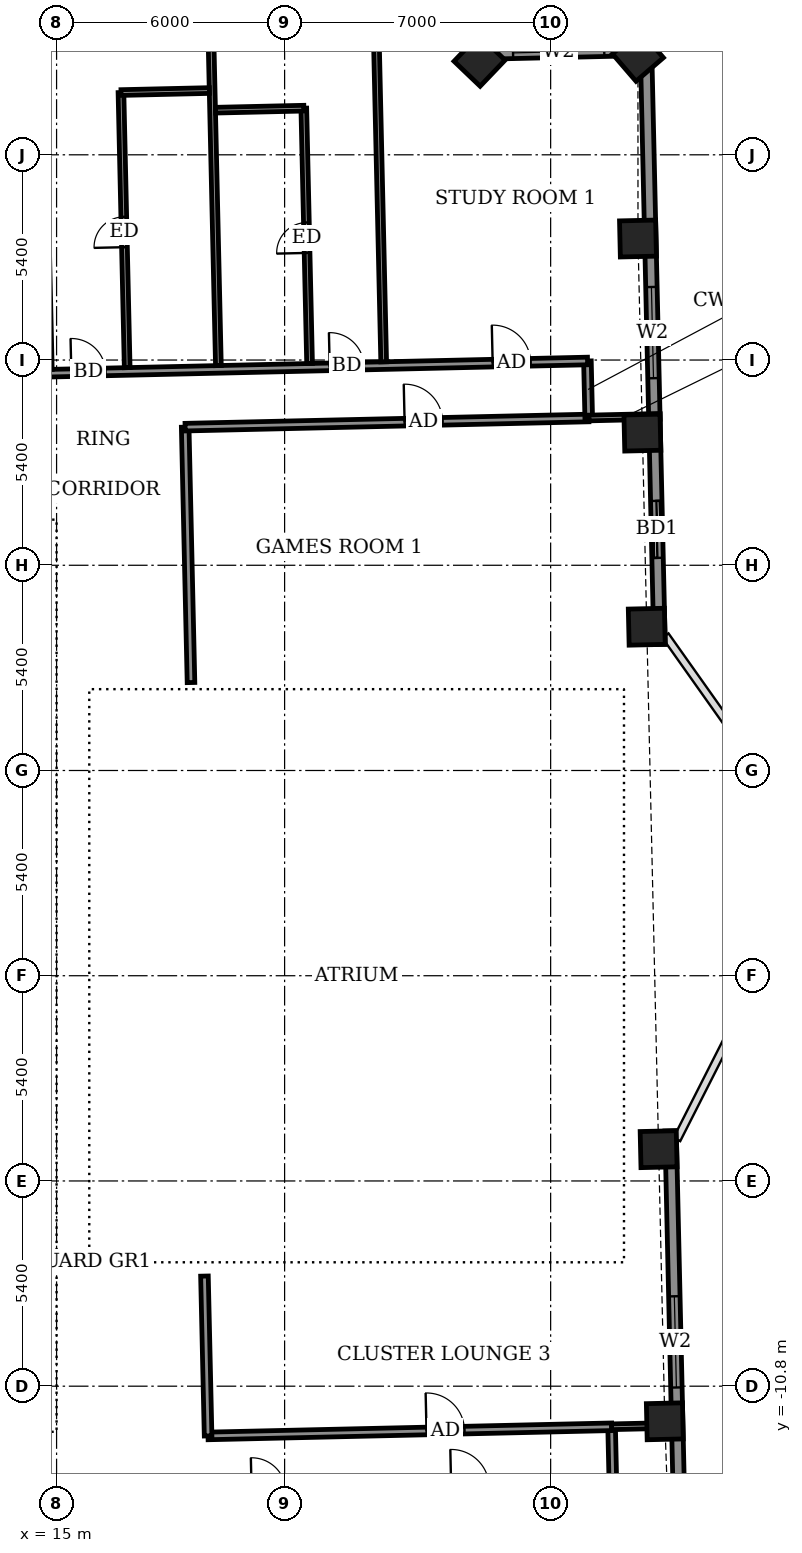
"""IFC4 building model, lengths in metres.
Left out: names, types, materials, properties, quantities, classifications, styles, units other than length and angle.
Written with IfcOpenShell. Run it as: python <this file> out.ifc"""

import sys

from ifc_helpers import new_model, si_unit, direction, frame, frame_2d, origin, origin_2d, place, context, subcontext, project, spatial, rectangle, extrude, element, fill, save


model = new_model("IFC4")
c1 = context("Model", 3, precision=1e-05, world=origin(), true_north=direction((0.0, 1.0)))
c2 = subcontext(c1, "Body", "Model", "MODEL_VIEW")
j1 = project(units=[si_unit("LENGTHUNIT", "METRE"), si_unit("PLANEANGLEUNIT", "RADIAN")], contexts=[c1])
p1 = place(None, origin())
s1 = spatial("IfcSite", under=j1, at=p1, CompositionType="ELEMENT")
p2 = place(p1, origin())
s2 = spatial("IfcBuilding", under=s1, at=p2, CompositionType="ELEMENT")
p3 = place(p2, frame((0.0, 0.0, 279.9)))
s3 = spatial("IfcBuildingStorey", under=s2, at=p3, CompositionType="ELEMENT", Elevation=279.9)
for number, where, z_axis, x_axis in (
    (1, (31.004, -11.724, -0.55), (0.0, 0.0, 1.0), (-0.023, 1.0, 0.0)),
    (2, (30.841, -4.564, -0.55), (0.0, 0.0, 1.0), (-0.023, 1.0, 0.0)),
    (3, (30.529, 9.183, -0.55), (0.0, 0.0, 1.0), (-0.023, 1.0, 0.0)),
    (4, (30.414, 14.29, -0.55), (0.0, 0.0, 1.0), (-0.023, 1.0, 0.0)),
    (5, (30.298, 19.397, -0.55), (0.0, 0.0, 1.0), (-0.023, 1.0, 0.0)),
    (6, (30.297, 24.205, -0.55), (0.0, 0.0, 1.0), (-0.652, 0.758, 0.0)),
    (7, (26.13, 24.077, -0.55), (0.0, 0.0, 1.0), (-0.723, 0.691, 0.0)),
):
    element("IfcColumn", number, at=place(p3, frame(where, z_axis=z_axis, x_axis=x_axis)), inside=s3, PredefinedType="COLUMN", context=c2, shape_type="SweptSolid", body=[
        extrude(rectangle(XDim=0.95, YDim=0.95, at=origin_2d()), origin(), (0.0, 0.0, 1.0), 3.6),
    ])
p4 = place(p3, frame((31.488, -18.727, 0.0), z_axis=(0.0, 0.0, 1.0), x_axis=(-0.022666132143, 0.999743090226, 0.0)))
e8 = element("IfcWall", 8, at=p4, inside=s3, PredefinedType="SOLIDWALL", context=c2, shape_type="SweptSolid", body=[
    extrude(rectangle(XDim=14.649, YDim=0.3, at=frame_2d((7.324, 0.0))), origin(), (0.0, 0.0, 1.0), 2.5),
])
p5 = place(p4, frame((2.915, 0.0, 0.0)))
e9 = element("IfcOpeningElement", 9, at=p5, cuts=e8, PredefinedType="OPENING", context=c2, shape_type="SweptSolid", body=[
    extrude(rectangle(XDim=1.5, YDim=2.4, at=frame_2d((0.75, 1.2))), frame((0.0, 0.16, 0.0), z_axis=(0.0, -1.0, 0.0), x_axis=(1.0, 0.0, 0.0)), (0.0, 0.0, 1.0), 0.32),
])
p6 = place(p4, frame((7.895, 0.0, 0.9)))
e10 = element("IfcOpeningElement", 10, at=p6, cuts=e8, PredefinedType="OPENING", context=c2, shape_type="SweptSolid", body=[
    extrude(rectangle(XDim=2.4, YDim=1.5, at=frame_2d((1.2, 0.75))), frame((0.0, 0.16, 0.0), z_axis=(0.0, -1.0, 0.0), x_axis=(1.0, 0.0, 0.0)), (0.0, 0.0, 1.0), 0.32),
])
p7 = place(p3, frame((30.865, 8.716, 0.0), z_axis=(0.0, 0.0, 1.0), x_axis=(-0.022682425427, 0.999742720692, 0.0)))
e11 = element("IfcWall", 11, at=p7, inside=s3, PredefinedType="SOLIDWALL", context=c2, shape_type="SweptSolid", body=[
    extrude(rectangle(XDim=15.65, YDim=0.3, at=frame_2d((7.825, 0.0))), origin(), (0.0, 0.0, 1.0), 2.55),
])
p8 = place(p7, frame((2.279, 0.0, 0.0)))
e12 = element("IfcOpeningElement", 12, at=p8, cuts=e11, PredefinedType="OPENING", context=c2, shape_type="SweptSolid", body=[
    extrude(rectangle(XDim=1.5, YDim=2.4, at=frame_2d((0.75, 1.2))), frame((0.0, 0.16, 0.0), z_axis=(0.0, -1.0, 0.0), x_axis=(1.0, 0.0, 0.0)), (0.0, 0.0, 1.0), 0.32),
])
p9 = place(p7, frame((7.008, 0.0, 0.9)))
e13 = element("IfcOpeningElement", 13, at=p9, cuts=e11, PredefinedType="OPENING", context=c2, shape_type="SweptSolid", body=[
    extrude(rectangle(XDim=2.4, YDim=1.5, at=frame_2d((1.2, 0.75))), frame((0.0, 0.16, 0.0), z_axis=(0.0, -1.0, 0.0), x_axis=(1.0, 0.0, 0.0)), (0.0, 0.0, 1.0), 0.32),
])
p10 = place(p3, frame((30.51, 24.362, 0.0), z_axis=(0.0, 0.0, 1.0), x_axis=(-0.999739037152, -0.022844202663, 0.0)))
e14 = element("IfcWall", 14, at=p10, inside=s3, PredefinedType="SOLIDWALL", context=c2, shape_type="SweptSolid", body=[
    extrude(rectangle(XDim=4.2, YDim=0.3, at=frame_2d((2.1, 0.0))), origin(), (0.0, 0.0, 1.0), 2.55),
])
p11 = place(p10, frame((1.1, 0.0, 0.9)))
e15 = element("IfcOpeningElement", 15, at=p11, cuts=e14, PredefinedType="OPENING", context=c2, shape_type="SweptSolid", body=[
    extrude(rectangle(XDim=2.4, YDim=1.5, at=frame_2d((1.2, 0.75))), frame((0.0, 0.16, 0.0), z_axis=(0.0, -1.0, 0.0), x_axis=(1.0, 0.0, 0.0)), (0.0, 0.0, 1.0), 0.32),
])
p12 = place(p3, frame((26.311, 24.266, 0.0), z_axis=(0.0, 0.0, 1.0), x_axis=(-0.022611811187, 0.999744320311, 0.0)))
e16 = element("IfcWall", 16, at=p12, inside=s3, PredefinedType="SOLIDWALL", context=c2, shape_type="SweptSolid", body=[
    extrude(rectangle(XDim=4.2, YDim=0.3, at=frame_2d((2.1, 0.0))), origin(), (0.0, 0.0, 1.0), 2.55),
])
p13 = place(p12, frame((0.688, 0.0, 0.9)))
e17 = element("IfcOpeningElement", 17, at=p13, cuts=e16, PredefinedType="OPENING", context=c2, shape_type="SweptSolid", body=[
    extrude(rectangle(XDim=2.4, YDim=1.5, at=frame_2d((1.2, 0.75))), frame((0.0, 0.16, 0.0), z_axis=(0.0, -1.0, 0.0), x_axis=(1.0, 0.0, 0.0)), (0.0, 0.0, 1.0), 0.32),
])
p14 = place(p3, frame((29.638, -13.368, 0.0), z_axis=(0.0, 0.0, 1.0), x_axis=(-0.022617910375, 0.999744182344, 0.0)))
e18 = element("IfcWall", 18, at=p14, inside=s3, PredefinedType="PARTITIONING", context=c2, shape_type="SweptSolid", body=[
    extrude(rectangle(XDim=1.5, YDim=0.2, at=frame_2d((0.75, 0.0))), origin(), (0.0, 0.0, 1.0), 3.05),
])
p15 = place(p3, frame((18.985, -12.109, 0.0), z_axis=(0.0, 0.0, 1.0), x_axis=(0.999742771882, 0.022680169073, 0.0)))
e19 = element("IfcWall", 19, at=p15, inside=s3, PredefinedType="PARTITIONING", context=c2, shape_type="SweptSolid", body=[
    extrude(rectangle(XDim=10.625, YDim=0.2, at=frame_2d((5.312, 0.0))), origin(), (0.0, 0.0, 1.0), 3.05),
])
p16 = place(p15, frame((5.75, 0.0, 0.0)))
e20 = element("IfcOpeningElement", 20, at=p16, cuts=e19, PredefinedType="OPENING", context=c2, shape_type="SweptSolid", body=[
    extrude(rectangle(XDim=1.0, YDim=2.1, at=frame_2d((0.5, 1.05))), frame((0.0, 0.11, 0.0), z_axis=(0.0, -1.0, 0.0), x_axis=(1.0, 0.0, 0.0)), (0.0, 0.0, 1.0), 0.22),
])
p17 = place(p3, frame((18.987, -12.109, 0.0), z_axis=(0.0, 0.0, 1.0), x_axis=(-0.022807092041, 0.999739884446, 0.0)))
e21 = element("IfcWall", 21, at=p17, inside=s3, PredefinedType="PARTITIONING", context=c2, shape_type="SweptSolid", body=[
    extrude(rectangle(XDim=4.207, YDim=0.2, at=frame_2d((2.104, 0.0))), origin(), (0.0, 0.0, 1.0), 3.05),
])
p18 = place(p3, frame((29.603, -11.868, 0.0), z_axis=(0.0, 0.0, 1.0), x_axis=(0.999741755729, 0.022724916977, 0.0)))
e22 = element("IfcWall", 22, at=p18, inside=s3, PredefinedType="PARTITIONING", context=c2, shape_type="SweptSolid", body=[
    extrude(rectangle(XDim=1.579, YDim=0.15, at=frame_2d((0.79, 0.0))), origin(), (0.0, 0.0, 1.0), 3.05),
])
p19 = place(p3, frame((18.537, 7.714, 0.0), z_axis=(0.0, 0.0, 1.0), x_axis=(-0.022773383809, 0.999740652864, 0.0)))
e23 = element("IfcWall", 23, at=p19, inside=s3, PredefinedType="PARTITIONING", context=c2, shape_type="SweptSolid", body=[
    extrude(rectangle(XDim=6.722, YDim=0.2, at=frame_2d((3.361, 0.0))), origin(), (0.0, 0.0, 1.0), 3.05),
])
p20 = place(p3, frame((18.382, 14.434, 0.0), z_axis=(0.0, 0.0, 1.0), x_axis=(0.999742819156, 0.02267808514, 0.0)))
e24 = element("IfcWall", 24, at=p20, inside=s3, PredefinedType="PARTITIONING", context=c2, shape_type="SweptSolid", body=[
    extrude(rectangle(XDim=10.625, YDim=0.2, at=frame_2d((5.313, 0.0))), origin(), (0.0, 0.0, 1.0), 3.05),
])
p21 = place(p20, frame((5.777, 0.0, 0.0)))
e25 = element("IfcOpeningElement", 25, at=p21, cuts=e24, PredefinedType="OPENING", context=c2, shape_type="SweptSolid", body=[
    extrude(rectangle(XDim=1.0, YDim=2.1, at=frame_2d((0.5, 1.05))), frame((0.0, 0.11, 0.0), z_axis=(0.0, -1.0, 0.0), x_axis=(1.0, 0.0, 0.0)), (0.0, 0.0, 1.0), 0.22),
])
p22 = place(p3, frame((29.002, 14.675, 0.0), z_axis=(0.0, 0.0, 1.0), x_axis=(-0.022617910375, 0.999744182344, 0.0)))
e26 = element("IfcWall", 26, at=p22, inside=s3, PredefinedType="PARTITIONING", context=c2, shape_type="SweptSolid", body=[
    extrude(rectangle(XDim=1.5, YDim=0.2, at=frame_2d((0.75, 0.0))), origin(), (0.0, 0.0, 1.0), 3.05),
])
p23 = place(p3, frame((29.005, 14.675, 0.0), z_axis=(0.0, 0.0, 1.0), x_axis=(0.999737243051, 0.022922583999, 0.0)))
e27 = element("IfcWall", 27, at=p23, inside=s3, PredefinedType="PARTITIONING", context=c2, shape_type="SweptSolid", body=[
    extrude(rectangle(XDim=1.875, YDim=0.15, at=frame_2d((0.937, 0.0))), origin(), (0.0, 0.0, 1.0), 2.55),
])
p24 = place(p3, frame((-26.401, 14.918, 0.0), z_axis=(0.0, 0.0, 1.0), x_axis=(0.99974239733, 0.022696673341, 0.0)))
e28 = element("IfcWall", 28, at=p24, inside=s3, PredefinedType="PARTITIONING", context=c2, shape_type="SweptSolid", body=[
    extrude(rectangle(XDim=55.386, YDim=0.2, at=frame_2d((27.693, 0.0))), origin(), (0.0, 0.0, 1.0), 3.05),
])
p25 = place(p24, frame((52.889, 0.0, 0.0)))
e29 = element("IfcOpeningElement", 29, at=p25, cuts=e28, PredefinedType="OPENING", context=c2, shape_type="SweptSolid", body=[
    extrude(rectangle(XDim=1.0, YDim=2.1, at=frame_2d((0.5, 1.05))), frame((0.0, 0.11, 0.0), z_axis=(0.0, -1.0, 0.0), x_axis=(1.0, 0.0, 0.0)), (0.0, 0.0, 1.0), 0.22),
])
p26 = place(p24, frame((48.6, 0.0, 0.0)))
e30 = element("IfcOpeningElement", 30, at=p26, cuts=e28, PredefinedType="OPENING", context=c2, shape_type="SweptSolid", body=[
    extrude(rectangle(XDim=0.9, YDim=2.1, at=frame_2d((0.45, 1.05))), frame((0.0, 0.11, 0.0), z_axis=(0.0, -1.0, 0.0), x_axis=(1.0, 0.0, 0.0)), (0.0, 0.0, 1.0), 0.22),
])
p27 = place(p24, frame((41.8, 0.0, 0.0)))
e31 = element("IfcOpeningElement", 31, at=p27, cuts=e28, PredefinedType="OPENING", context=c2, shape_type="SweptSolid", body=[
    extrude(rectangle(XDim=0.9, YDim=2.1, at=frame_2d((0.45, 1.05))), frame((0.0, 0.11, 0.0), z_axis=(0.0, -1.0, 0.0), x_axis=(1.0, 0.0, 0.0)), (0.0, 0.0, 1.0), 0.22),
])
p28 = place(p24, frame((39.675, 0.0, 0.0)))
e32 = element("IfcOpeningElement", 32, at=p28, cuts=e28, PredefinedType="OPENING", context=c2, shape_type="SweptSolid", body=[
    extrude(rectangle(XDim=0.9, YDim=2.1, at=frame_2d((0.45, 1.05))), frame((0.0, 0.11, 0.0), z_axis=(0.0, -1.0, 0.0), x_axis=(1.0, 0.0, 0.0)), (0.0, 0.0, 1.0), 0.22),
])
p29 = place(p24, frame((32.675, 0.0, 0.0)))
e33 = element("IfcOpeningElement", 33, at=p29, cuts=e28, PredefinedType="OPENING", context=c2, shape_type="SweptSolid", body=[
    extrude(rectangle(XDim=0.9, YDim=2.1, at=frame_2d((0.45, 1.05))), frame((0.0, 0.11, 0.0), z_axis=(0.0, -1.0, 0.0), x_axis=(1.0, 0.0, 0.0)), (0.0, 0.0, 1.0), 0.22),
])
p30 = place(p24, frame((30.4, 0.0, 0.0)))
e34 = element("IfcOpeningElement", 34, at=p30, cuts=e28, PredefinedType="OPENING", context=c2, shape_type="SweptSolid", body=[
    extrude(rectangle(XDim=0.9, YDim=2.1, at=frame_2d((0.45, 1.05))), frame((0.0, 0.11, 0.0), z_axis=(0.0, -1.0, 0.0), x_axis=(1.0, 0.0, 0.0)), (0.0, 0.0, 1.0), 0.22),
])
p31 = place(p24, frame((23.225, 0.0, 0.0)))
e35 = element("IfcOpeningElement", 35, at=p31, cuts=e28, PredefinedType="OPENING", context=c2, shape_type="SweptSolid", body=[
    extrude(rectangle(XDim=0.9, YDim=2.1, at=frame_2d((0.45, 1.05))), frame((0.0, 0.11, 0.0), z_axis=(0.0, -1.0, 0.0), x_axis=(1.0, 0.0, 0.0)), (0.0, 0.0, 1.0), 0.22),
])
p32 = place(p24, frame((20.9, 0.0, 0.0)))
e36 = element("IfcOpeningElement", 36, at=p32, cuts=e28, PredefinedType="OPENING", context=c2, shape_type="SweptSolid", body=[
    extrude(rectangle(XDim=0.9, YDim=2.1, at=frame_2d((0.45, 1.05))), frame((0.0, 0.11, 0.0), z_axis=(0.0, -1.0, 0.0), x_axis=(1.0, 0.0, 0.0)), (0.0, 0.0, 1.0), 0.22),
])
p33 = place(p24, frame((13.9, 0.0, 0.0)))
e37 = element("IfcOpeningElement", 37, at=p33, cuts=e28, PredefinedType="OPENING", context=c2, shape_type="SweptSolid", body=[
    extrude(rectangle(XDim=0.9, YDim=2.1, at=frame_2d((0.45, 1.05))), frame((0.0, 0.11, 0.0), z_axis=(0.0, -1.0, 0.0), x_axis=(1.0, 0.0, 0.0)), (0.0, 0.0, 1.0), 0.22),
])
p34 = place(p24, frame((11.775, 0.0, 0.0)))
e38 = element("IfcOpeningElement", 38, at=p34, cuts=e28, PredefinedType="OPENING", context=c2, shape_type="SweptSolid", body=[
    extrude(rectangle(XDim=0.9, YDim=2.1, at=frame_2d((0.45, 1.05))), frame((0.0, 0.11, 0.0), z_axis=(0.0, -1.0, 0.0), x_axis=(1.0, 0.0, 0.0)), (0.0, 0.0, 1.0), 0.22),
])
p35 = place(p24, frame((1.65, 0.0, 0.0)))
e39 = element("IfcOpeningElement", 39, at=p35, cuts=e28, PredefinedType="OPENING", context=c2, shape_type="SweptSolid", body=[
    extrude(rectangle(XDim=1.0, YDim=2.1, at=frame_2d((0.5, 1.05))), frame((0.0, 0.11, 0.0), z_axis=(0.0, -1.0, 0.0), x_axis=(1.0, 0.0, 0.0)), (0.0, 0.0, 1.0), 0.22),
])
p36 = place(p24, frame((7.025, 0.0, 0.0)))
e40 = element("IfcOpeningElement", 40, at=p36, cuts=e28, PredefinedType="OPENING", context=c2, shape_type="SweptSolid", body=[
    extrude(rectangle(XDim=0.9, YDim=2.1, at=frame_2d((0.45, 1.05))), frame((0.0, 0.11, 0.0), z_axis=(0.0, -1.0, 0.0), x_axis=(1.0, 0.0, 0.0)), (0.0, 0.0, 1.0), 0.22),
])
p37 = place(p3, frame((16.858, 16.0, 0.0), z_axis=(0.0, 0.0, 1.0), x_axis=(-0.022627186748, 0.999743972435, 0.0)))
e41 = element("IfcWall", 41, at=p37, inside=s3, PredefinedType="PARTITIONING", context=c2, shape_type="SweptSolid", body=[
    extrude(rectangle(XDim=7.24, YDim=0.15, at=frame_2d((3.62, 0.0))), origin(), (0.0, 0.0, 1.0), 3.05),
])
p38 = place(p37, frame((3.17, 0.0, 0.0)))
e42 = element("IfcOpeningElement", 42, at=p38, cuts=e41, PredefinedType="OPENING", context=c2, shape_type="SweptSolid", body=[
    extrude(rectangle(XDim=0.8, YDim=2.1, at=frame_2d((0.4, 1.05))), frame((0.0, 0.085, 0.0), z_axis=(0.0, -1.0, 0.0), x_axis=(1.0, 0.0, 0.0)), (0.0, 0.0, 1.0), 0.17),
])
p39 = place(p3, frame((19.258, 16.054, 0.0), z_axis=(0.0, 0.0, 1.0), x_axis=(-0.022740189192, 0.999741408463, 0.0)))
e43 = element("IfcWall", 43, at=p39, inside=s3, PredefinedType="PARTITIONING", context=c2, shape_type="SweptSolid", body=[
    extrude(rectangle(XDim=12.4, YDim=0.15, at=frame_2d((6.2, 0.0))), origin(), (0.0, 0.0, 1.0), 3.05),
])
p40 = place(p3, frame((21.657, 16.109, 0.0), z_axis=(0.0, 0.0, 1.0), x_axis=(-0.022634748998, 0.99974380125, 0.0)))
e44 = element("IfcWall", 44, at=p40, inside=s3, PredefinedType="PARTITIONING", context=c2, shape_type="SweptSolid", body=[
    extrude(rectangle(XDim=6.72, YDim=0.15, at=frame_2d((3.36, 0.0))), origin(), (0.0, 0.0, 1.0), 3.05),
])
p41 = place(p40, frame((2.91, 0.0, 0.0)))
e45 = element("IfcOpeningElement", 45, at=p41, cuts=e44, PredefinedType="OPENING", context=c2, shape_type="SweptSolid", body=[
    extrude(rectangle(XDim=0.8, YDim=2.1, at=frame_2d((0.4, 1.05))), frame((0.0, 0.085, 0.0), z_axis=(0.0, -1.0, 0.0), x_axis=(1.0, 0.0, 0.0)), (0.0, 0.0, 1.0), 0.17),
])
p42 = place(p3, frame((23.607, 16.153, 0.0), z_axis=(0.0, 0.0, 1.0), x_axis=(-0.022740189192, 0.999741408463, 0.0)))
e46 = element("IfcWall", 46, at=p42, inside=s3, PredefinedType="PARTITIONING", context=c2, shape_type="SweptSolid", body=[
    extrude(rectangle(XDim=12.4, YDim=0.15, at=frame_2d((6.2, 0.0))), origin(), (0.0, 0.0, 1.0), 2.55),
])
p43 = place(p3, frame((19.182, 22.774, 0.0), z_axis=(0.0, 0.0, 1.0), x_axis=(0.99974053329, 0.022778632478, 0.0)))
e47 = element("IfcWall", 47, at=p43, inside=s3, PredefinedType="PARTITIONING", context=c2, shape_type="SweptSolid", body=[
    extrude(rectangle(XDim=2.326, YDim=0.15, at=frame_2d((1.163, 0.0))), origin(), (0.0, 0.0, 1.0), 3.05),
])
p44 = place(p3, frame((16.696, 23.238, 0.0), z_axis=(0.0, 0.0, 1.0), x_axis=(0.999740478815, 0.022781023197, 0.0)))
e48 = element("IfcWall", 48, at=p44, inside=s3, PredefinedType="PARTITIONING", context=c2, shape_type="SweptSolid", body=[
    extrude(rectangle(XDim=2.325, YDim=0.15, at=frame_2d((1.163, 0.0))), origin(), (0.0, 0.0, 1.0), 3.05),
])
p45 = place(p6, origin())
e49 = element("IfcWindow", 49, at=p45, inside=s3, PartitioningType="DOUBLE_PANEL_VERTICAL", PredefinedType="WINDOW", context=c2, shape_type="SweptSolid", body=[
    extrude(rectangle(XDim=2.4, YDim=1.5, at=frame_2d((1.2, 0.75))), frame((0.0, 0.03, 0.0), z_axis=(0.0, -1.0, 0.0), x_axis=(1.0, 0.0, 0.0)), (0.0, 0.0, 1.0), 0.06),
])
fill(e10, e49)
p46 = place(p8, origin())
e50 = element("IfcDoor", 50, at=p46, inside=s3, OperationType="SLIDING_TO_LEFT", PredefinedType="DOOR", context=c2, shape_type="SweptSolid", body=[
    extrude(rectangle(XDim=1.5, YDim=2.4, at=frame_2d((0.75, 1.2))), frame((0.0, 0.025, 0.0), z_axis=(0.0, -1.0, 0.0), x_axis=(1.0, 0.0, 0.0)), (0.0, 0.0, 1.0), 0.05),
])
fill(e12, e50)
p47 = place(p9, origin())
e51 = element("IfcWindow", 51, at=p47, inside=s3, PartitioningType="DOUBLE_PANEL_VERTICAL", PredefinedType="WINDOW", context=c2, shape_type="SweptSolid", body=[
    extrude(rectangle(XDim=2.4, YDim=1.5, at=frame_2d((1.2, 0.75))), frame((0.0, 0.03, 0.0), z_axis=(0.0, -1.0, 0.0), x_axis=(1.0, 0.0, 0.0)), (0.0, 0.0, 1.0), 0.06),
])
fill(e13, e51)
p48 = place(p11, origin())
e52 = element("IfcWindow", 52, at=p48, inside=s3, PartitioningType="DOUBLE_PANEL_VERTICAL", PredefinedType="WINDOW", context=c2, shape_type="SweptSolid", body=[
    extrude(rectangle(XDim=2.4, YDim=1.5, at=frame_2d((1.2, 0.75))), frame((0.0, 0.03, 0.0), z_axis=(0.0, -1.0, 0.0), x_axis=(1.0, 0.0, 0.0)), (0.0, 0.0, 1.0), 0.06),
])
fill(e15, e52)
p49 = place(p16, origin())
e53 = element("IfcDoor", 53, at=p49, inside=s3, OperationType="SINGLE_SWING_LEFT", PredefinedType="DOOR", context=c2, shape_type="SweptSolid", body=[
    extrude(rectangle(XDim=1.0, YDim=2.1, at=frame_2d((0.5, 1.05))), frame((0.0, 0.025, 0.0), z_axis=(0.0, -1.0, 0.0), x_axis=(1.0, 0.0, 0.0)), (0.0, 0.0, 1.0), 0.05),
])
fill(e20, e53)
p50 = place(p21, origin())
e54 = element("IfcDoor", 54, at=p50, inside=s3, OperationType="SINGLE_SWING_RIGHT", PredefinedType="DOOR", context=c2, shape_type="SweptSolid", body=[
    extrude(rectangle(XDim=1.0, YDim=2.1, at=frame_2d((0.5, 1.05))), frame((0.0, 0.025, 0.0), z_axis=(0.0, -1.0, 0.0), x_axis=(1.0, 0.0, 0.0)), (0.0, 0.0, 1.0), 0.05),
])
fill(e25, e54)
p51 = place(p25, origin())
e55 = element("IfcDoor", 55, at=p51, inside=s3, OperationType="SINGLE_SWING_LEFT", PredefinedType="DOOR", context=c2, shape_type="SweptSolid", body=[
    extrude(rectangle(XDim=1.0, YDim=2.1, at=frame_2d((0.5, 1.05))), frame((0.0, 0.025, 0.0), z_axis=(0.0, -1.0, 0.0), x_axis=(1.0, 0.0, 0.0)), (0.0, 0.0, 1.0), 0.05),
])
fill(e29, e55)
p52 = place(p26, origin())
e56 = element("IfcDoor", 56, at=p52, inside=s3, OperationType="SINGLE_SWING_RIGHT", PredefinedType="DOOR", context=c2, shape_type="SweptSolid", body=[
    extrude(rectangle(XDim=0.9, YDim=2.1, at=frame_2d((0.45, 1.05))), frame((0.0, 0.025, 0.0), z_axis=(0.0, -1.0, 0.0), x_axis=(1.0, 0.0, 0.0)), (0.0, 0.0, 1.0), 0.05),
])
fill(e30, e56)
p53 = place(p41, origin())
e57 = element("IfcDoor", 57, at=p53, inside=s3, OperationType="SINGLE_SWING_RIGHT", PredefinedType="DOOR", context=c2, shape_type="SweptSolid", body=[
    extrude(rectangle(XDim=0.8, YDim=2.1, at=frame_2d((0.4, 1.05))), frame((0.0, 0.025, 0.0), z_axis=(0.0, -1.0, 0.0), x_axis=(1.0, 0.0, 0.0)), (0.0, 0.0, 1.0), 0.05),
])
fill(e45, e57)
p54 = place(p27, origin())
e58 = element("IfcDoor", 58, at=p54, inside=s3, OperationType="SINGLE_SWING_LEFT", PredefinedType="DOOR", context=c2, shape_type="SweptSolid", body=[
    extrude(rectangle(XDim=0.9, YDim=2.1, at=frame_2d((0.45, 1.05))), frame((0.0, 0.025, 0.0), z_axis=(0.0, -1.0, 0.0), x_axis=(1.0, 0.0, 0.0)), (0.0, 0.0, 1.0), 0.05),
])
fill(e31, e58)
p55 = place(p38, origin())
e59 = element("IfcDoor", 59, at=p55, inside=s3, OperationType="SINGLE_SWING_LEFT", PredefinedType="DOOR", context=c2, shape_type="SweptSolid", body=[
    extrude(rectangle(XDim=0.8, YDim=2.1, at=frame_2d((0.4, 1.05))), frame((0.0, 0.025, 0.0), z_axis=(0.0, -1.0, 0.0), x_axis=(1.0, 0.0, 0.0)), (0.0, 0.0, 1.0), 0.05),
])
fill(e42, e59)
save(model, sys.argv[1])
